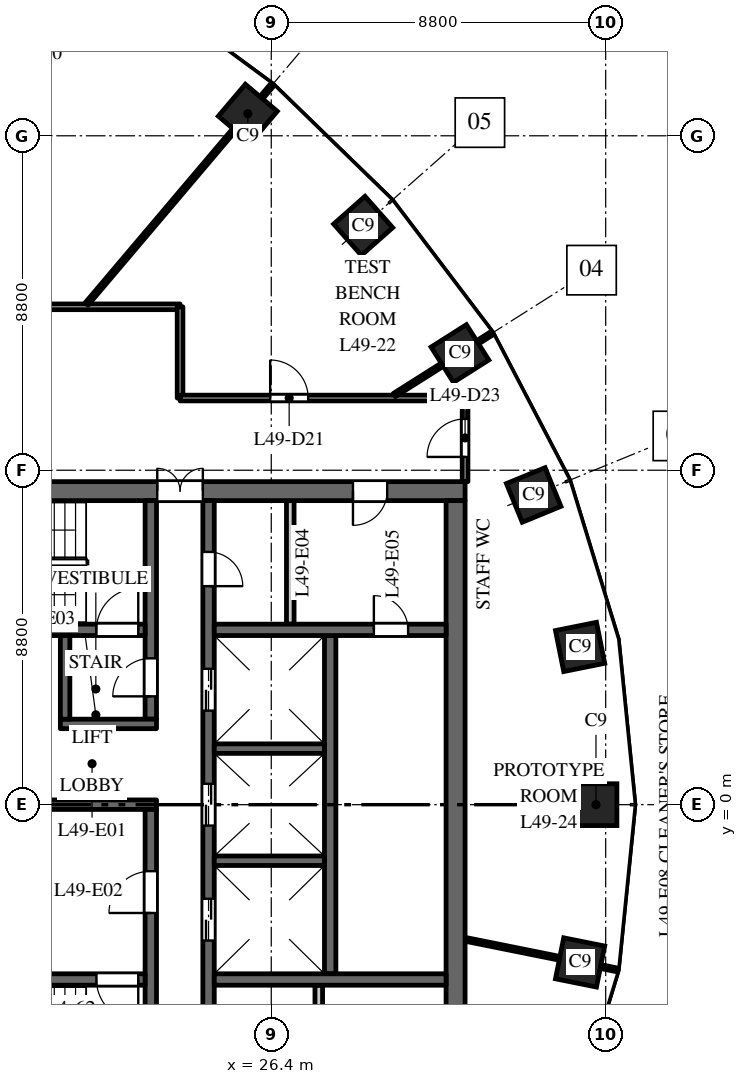
"""IFC4 building model, lengths in metres.
Left out: names, types, materials, properties, quantities, classifications, styles, units other than length and angle.
Written with IfcOpenShell. Run it as: python <this file> out.ifc"""

import sys

from ifc_helpers import new_model, si_unit, direction, frame, frame_2d, origin, origin_2d, place, context, subcontext, project, spatial, rectangle, extrude, element, fill, save


model = new_model("IFC4")
c1 = context("Model", 3, precision=1e-05, world=origin(), true_north=direction((0.0, 1.0)))
c2 = subcontext(c1, "Body", "Model", "MODEL_VIEW")
j1 = project(units=[si_unit("LENGTHUNIT", "METRE"), si_unit("PLANEANGLEUNIT", "RADIAN")], contexts=[c1])
p1 = place(None, origin())
s1 = spatial("IfcSite", under=j1, at=p1, CompositionType="ELEMENT")
p2 = place(p1, origin())
s2 = spatial("IfcBuilding", under=s1, at=p2, CompositionType="ELEMENT")
p3 = place(p2, frame((0.0, 0.0, 237.5)))
s3 = spatial("IfcBuildingStorey", under=s2, at=p3, CompositionType="ELEMENT", Elevation=237.5)
for number, where, z_axis, x_axis in (
    (1, (34.945, 0.0, 0.0), (0.0, 0.0, 1.0), (0.0, 1.0, 0.0)),
    (2, (34.527, 4.151, 0.0), (0.0, 0.0, 1.0), (-0.197, 0.98, 0.0)),
    (3, (33.305, 8.149, 0.0), (0.0, 0.0, 1.0), (-0.379, 0.925, 0.0)),
    (4, (31.365, 11.871, 0.0), (0.0, 0.0, 1.0), (-0.535, 0.845, 0.0)),
    (5, (28.819, 15.23, 0.0), (0.0, 0.0, 1.0), (-0.663, 0.749, 0.0)),
    (6, (25.783, 18.18, 0.0), (0.0, 0.0, 1.0), (-0.763, 0.646, 0.0)),
    (7, (34.527, -4.151, 0.0), (0.0, 0.0, 1.0), (0.197, 0.98, 0.0)),
):
    element("IfcColumn", number, at=place(p3, frame(where, z_axis=z_axis, x_axis=x_axis)), inside=s3, PredefinedType="COLUMN", context=c2, shape_type="SweptSolid", body=[
        extrude(rectangle(XDim=1.1, YDim=1.1, at=origin_2d()), origin(), (0.0, 0.0, 1.0), 4.0),
    ])
p4 = place(p3, frame((16.5, 8.25, 0.0), z_axis=(0.0, 0.0, 1.0), x_axis=(1.0, 0.0, 0.0)))
e8 = element("IfcWall", 8, at=p4, inside=s3, PredefinedType="SHEAR", context=c2, shape_type="SweptSolid", body=[
    extrude(rectangle(XDim=15.0, YDim=0.5, at=frame_2d((7.5, 0.0))), origin(), (0.0, 0.0, 1.0), 3.7),
])
p5 = place(p4, frame((6.9, 0.0, 0.0)))
e9 = element("IfcOpeningElement", 9, at=p5, cuts=e8, PredefinedType="OPENING", context=c2, shape_type="SweptSolid", body=[
    extrude(rectangle(XDim=1.2, YDim=2.1, at=frame_2d((0.6, 1.05))), frame((0.0, 0.26, 0.0), z_axis=(0.0, -1.0, 0.0), x_axis=(1.0, 0.0, 0.0)), (0.0, 0.0, 1.0), 0.52),
])
p6 = place(p4, frame((12.05, 0.0, 0.0)))
e10 = element("IfcOpeningElement", 10, at=p6, cuts=e8, PredefinedType="OPENING", context=c2, shape_type="SweptSolid", body=[
    extrude(rectangle(XDim=0.9, YDim=2.1, at=frame_2d((0.45, 1.05))), frame((0.0, 0.26, 0.0), z_axis=(0.0, -1.0, 0.0), x_axis=(1.0, 0.0, 0.0)), (0.0, 0.0, 1.0), 0.52),
])
p7 = place(p3, frame((27.95, -4.45, 0.0), z_axis=(0.0, 0.0, 1.0), x_axis=(0.0, 1.0, 0.0)))
e11 = element("IfcWall", 11, at=p7, inside=s3, PredefinedType="SHEAR", context=c2, shape_type="SweptSolid", body=[
    extrude(rectangle(XDim=8.9, YDim=0.3, at=frame_2d((4.45, 0.0))), origin(), (0.0, 0.0, 1.0), 3.7),
])
p8 = place(p3, frame((24.75, -8.0, 0.0), z_axis=(0.0, 0.0, 1.0), x_axis=(0.0, 1.0, 0.0)))
e12 = element("IfcWall", 12, at=p8, inside=s3, PredefinedType="SHEAR", context=c2, shape_type="SweptSolid", body=[
    extrude(rectangle(XDim=16.0, YDim=0.3, at=frame_2d((8.0, 0.0))), origin(), (0.0, 0.0, 1.0), 3.7),
])
p9 = place(p8, frame((4.425, 0.0, 0.0)))
e13 = element("IfcOpeningElement", 13, at=p9, cuts=e12, PredefinedType="OPENING", context=c2, shape_type="SweptSolid", body=[
    extrude(rectangle(XDim=1.1, YDim=2.1, at=frame_2d((0.55, 1.05))), frame((0.0, 0.16, 0.0), z_axis=(0.0, -1.0, 0.0), x_axis=(1.0, 0.0, 0.0)), (0.0, 0.0, 1.0), 0.32),
])
p10 = place(p8, frame((7.45, 0.0, 0.0)))
e14 = element("IfcOpeningElement", 14, at=p10, cuts=e12, PredefinedType="OPENING", context=c2, shape_type="SweptSolid", body=[
    extrude(rectangle(XDim=1.1, YDim=2.1, at=frame_2d((0.55, 1.05))), frame((0.0, 0.16, 0.0), z_axis=(0.0, -1.0, 0.0), x_axis=(1.0, 0.0, 0.0)), (0.0, 0.0, 1.0), 0.32),
])
p11 = place(p8, frame((10.475, 0.0, 0.0)))
e15 = element("IfcOpeningElement", 15, at=p11, cuts=e12, PredefinedType="OPENING", context=c2, shape_type="SweptSolid", body=[
    extrude(rectangle(XDim=1.1, YDim=2.1, at=frame_2d((0.55, 1.05))), frame((0.0, 0.16, 0.0), z_axis=(0.0, -1.0, 0.0), x_axis=(1.0, 0.0, 0.0)), (0.0, 0.0, 1.0), 0.32),
])
p12 = place(p8, frame((13.75, 0.0, 0.0)))
e16 = element("IfcOpeningElement", 16, at=p12, cuts=e12, PredefinedType="OPENING", context=c2, shape_type="SweptSolid", body=[
    extrude(rectangle(XDim=0.9, YDim=2.1, at=frame_2d((0.45, 1.05))), frame((0.0, 0.16, 0.0), z_axis=(0.0, -1.0, 0.0), x_axis=(1.0, 0.0, 0.0)), (0.0, 0.0, 1.0), 0.32),
])
p13 = place(p8, frame((1.35, 0.0, 0.0)))
e17 = element("IfcOpeningElement", 17, at=p13, cuts=e12, PredefinedType="OPENING", context=c2, shape_type="SweptSolid", body=[
    extrude(rectangle(XDim=0.9, YDim=2.1, at=frame_2d((0.45, 1.05))), frame((0.0, 0.16, 0.0), z_axis=(0.0, -1.0, 0.0), x_axis=(1.0, 0.0, 0.0)), (0.0, 0.0, 1.0), 0.32),
])
p14 = place(p3, frame((20.1, 0.0, 0.0), z_axis=(0.0, 0.0, 1.0), x_axis=(1.0, 0.0, 0.0)))
e18 = element("IfcWall", 18, at=p14, inside=s3, PredefinedType="SHEAR", context=c2, shape_type="SweptSolid", body=[
    extrude(rectangle(XDim=3.28, YDim=0.25, at=frame_2d((1.64, 0.0))), origin(), (0.0, 0.0, 1.0), 3.7),
])
p15 = place(p3, frame((31.25, -8.0, 0.0), z_axis=(0.0, 0.0, 1.0), x_axis=(0.0, 1.0, 0.0)))
e19 = element("IfcWall", 19, at=p15, inside=s3, PredefinedType="SHEAR", context=c2, shape_type="SweptSolid", body=[
    extrude(rectangle(XDim=16.0, YDim=0.5, at=frame_2d((8.0, 0.0))), origin(), (0.0, 0.0, 1.0), 3.7),
])
p16 = place(p3, frame((24.9, 4.6, 0.0), z_axis=(0.0, 0.0, 1.0), x_axis=(1.0, 0.0, 0.0)))
e20 = element("IfcWall", 20, at=p16, inside=s3, PredefinedType="SHEAR", context=c2, shape_type="SweptSolid", body=[
    extrude(rectangle(XDim=6.1, YDim=0.3, at=frame_2d((3.05, 0.0))), origin(), (0.0, 0.0, 1.0), 3.7),
])
p17 = place(p16, frame((4.2, 0.0, 0.0)))
e21 = element("IfcOpeningElement", 21, at=p17, cuts=e20, PredefinedType="OPENING", context=c2, shape_type="SweptSolid", body=[
    extrude(rectangle(XDim=0.9, YDim=2.1, at=frame_2d((0.45, 1.05))), frame((0.0, 0.16, 0.0), z_axis=(0.0, -1.0, 0.0), x_axis=(1.0, 0.0, 0.0)), (0.0, 0.0, 1.0), 0.32),
])
for number, where, z_axis, x_axis in (
    (22, (26.9, 4.75, 0.0), (0.0, 0.0, 1.0), (0.0, 1.0, 0.0)),
    (23, (27.65, -8.0, 0.0), (0.0, 0.0, 1.0), (0.0, 1.0, 0.0)),
):
    element("IfcWall", number, at=place(p3, frame(where, z_axis=z_axis, x_axis=x_axis)), inside=s3, PredefinedType="PARTITIONING", context=c2, shape_type="SweptSolid", body=[
        extrude(rectangle(XDim=3.25, YDim=0.2, at=frame_2d((1.625, 0.0))), origin(), (0.0, 0.0, 1.0), 3.7),
    ])
p18 = place(p3, frame((24.9, -4.6, 0.0), z_axis=(0.0, 0.0, 1.0), x_axis=(1.0, 0.0, 0.0)))
e24 = element("IfcWall", 24, at=p18, inside=s3, PredefinedType="SHEAR", context=c2, shape_type="SweptSolid", body=[
    extrude(rectangle(XDim=6.1, YDim=0.3, at=frame_2d((3.05, 0.0))), origin(), (0.0, 0.0, 1.0), 3.7),
])
for number, where, z_axis, x_axis in (
    (25, (24.9, -1.475, 0.0), (0.0, 0.0, 1.0), (1.0, 0.0, 0.0)),
    (26, (24.9, 1.475, 0.0), (0.0, 0.0, 1.0), (1.0, 0.0, 0.0)),
):
    element("IfcWall", number, at=place(p3, frame(where, z_axis=z_axis, x_axis=x_axis)), inside=s3, PredefinedType="SHEAR", context=c2, shape_type="SweptSolid", body=[
        extrude(rectangle(XDim=2.9, YDim=0.25, at=frame_2d((1.45, 0.0))), origin(), (0.0, 0.0, 1.0), 3.7),
    ])
p19 = place(p3, frame((23.23, 2.25, 0.0), z_axis=(0.0, 0.0, 1.0), x_axis=(0.0, 1.0, 0.0)))
e27 = element("IfcWall", 27, at=p19, inside=s3, PredefinedType="SHEAR", context=c2, shape_type="SweptSolid", body=[
    extrude(rectangle(XDim=5.75, YDim=0.3, at=frame_2d((2.875, 0.0))), origin(), (0.0, 0.0, 1.0), 3.7),
])
p20 = place(p19, frame((0.6, 0.0, 0.0)))
e28 = element("IfcOpeningElement", 28, at=p20, cuts=e27, PredefinedType="OPENING", context=c2, shape_type="SweptSolid", body=[
    extrude(rectangle(XDim=1.0, YDim=2.1, at=frame_2d((0.5, 1.05))), frame((0.0, 0.16, 0.0), z_axis=(0.0, -1.0, 0.0), x_axis=(1.0, 0.0, 0.0)), (0.0, 0.0, 1.0), 0.32),
])
p21 = place(p3, frame((23.23, -8.0, 0.0), z_axis=(0.0, 0.0, 1.0), x_axis=(0.0, 1.0, 0.0)))
e29 = element("IfcWall", 29, at=p21, inside=s3, PredefinedType="SHEAR", context=c2, shape_type="SweptSolid", body=[
    extrude(rectangle(XDim=7.875, YDim=0.3, at=frame_2d((3.938, 0.0))), origin(), (0.0, 0.0, 1.0), 3.7),
])
p22 = place(p21, frame((5.15, 0.0, 0.0)))
e30 = element("IfcOpeningElement", 30, at=p22, cuts=e29, PredefinedType="OPENING", context=c2, shape_type="SweptSolid", body=[
    extrude(rectangle(XDim=1.1, YDim=2.1, at=frame_2d((0.55, 1.05))), frame((0.0, 0.16, 0.0), z_axis=(0.0, -1.0, 0.0), x_axis=(1.0, 0.0, 0.0)), (0.0, 0.0, 1.0), 0.32),
])
p23 = place(p3, frame((16.9, 4.6, 0.0), z_axis=(0.0, 0.0, 1.0), x_axis=(1.0, 0.0, 0.0)))
e31 = element("IfcWall", 31, at=p23, inside=s3, PredefinedType="SHEAR", context=c2, shape_type="SweptSolid", body=[
    extrude(rectangle(XDim=6.18, YDim=0.3, at=frame_2d((3.09, 0.0))), origin(), (0.0, 0.0, 1.0), 3.7),
])
p24 = place(p23, frame((4.9, 0.0, 0.0)))
e32 = element("IfcOpeningElement", 32, at=p24, cuts=e31, PredefinedType="OPENING", context=c2, shape_type="SweptSolid", body=[
    extrude(rectangle(XDim=1.1, YDim=2.1, at=frame_2d((0.55, 1.05))), frame((0.0, 0.16, 0.0), z_axis=(0.0, -1.0, 0.0), x_axis=(1.0, 0.0, 0.0)), (0.0, 0.0, 1.0), 0.32),
])
p25 = place(p3, frame((16.9, -4.6, 0.0), z_axis=(0.0, 0.0, 1.0), x_axis=(1.0, 0.0, 0.0)))
e33 = element("IfcWall", 33, at=p25, inside=s3, PredefinedType="SHEAR", context=c2, shape_type="SweptSolid", body=[
    extrude(rectangle(XDim=6.18, YDim=0.3, at=frame_2d((3.09, 0.0))), origin(), (0.0, 0.0, 1.0), 3.7),
])
p26 = place(p25, frame((4.9, 0.0, 0.0)))
e34 = element("IfcOpeningElement", 34, at=p26, cuts=e33, PredefinedType="OPENING", context=c2, shape_type="SweptSolid", body=[
    extrude(rectangle(XDim=1.1, YDim=2.1, at=frame_2d((0.55, 1.05))), frame((0.0, 0.16, 0.0), z_axis=(0.0, -1.0, 0.0), x_axis=(1.0, 0.0, 0.0)), (0.0, 0.0, 1.0), 0.32),
])
p27 = place(p3, frame((20.85, 2.125, 0.0), z_axis=(0.0, 0.0, 1.0), x_axis=(1.0, 0.0, 0.0)))
e35 = element("IfcWall", 35, at=p27, inside=s3, PredefinedType="SHEAR", context=c2, shape_type="SweptSolid", body=[
    extrude(rectangle(XDim=2.53, YDim=0.25, at=frame_2d((1.265, 0.0))), origin(), (0.0, 0.0, 1.0), 3.7),
])
p28 = place(p3, frame((20.975, 2.25, 0.0), z_axis=(0.0, 0.0, 1.0), x_axis=(0.0, 1.0, 0.0)))
e36 = element("IfcWall", 36, at=p28, inside=s3, PredefinedType="SHEAR", context=c2, shape_type="SweptSolid", body=[
    extrude(rectangle(XDim=2.2, YDim=0.25, at=frame_2d((1.1, 0.0))), origin(), (0.0, 0.0, 1.0), 3.7),
])
p29 = place(p3, frame((7.524, 13.1, 0.0), z_axis=(0.0, 0.0, 1.0), x_axis=(1.0, 0.0, 0.0)))
e37 = element("IfcWall", 37, at=p29, inside=s3, PredefinedType="PARTITIONING", context=c2, shape_type="SweptSolid", body=[
    extrude(rectangle(XDim=16.476, YDim=0.15, at=frame_2d((8.238, 0.0))), origin(), (0.0, 0.0, 1.0), 2.85),
])
p30 = place(p29, frame((2.746, 0.0, 0.0)))
e38 = element("IfcOpeningElement", 38, at=p30, cuts=e37, PredefinedType="OPENING", context=c2, shape_type="SweptSolid", body=[
    extrude(rectangle(XDim=1.0, YDim=2.1, at=frame_2d((0.5, 1.05))), frame((0.0, 0.085, 0.0), z_axis=(0.0, -1.0, 0.0), x_axis=(1.0, 0.0, 0.0)), (0.0, 0.0, 1.0), 0.17),
])
p31 = place(p29, frame((9.56, 0.0, 0.0)))
e39 = element("IfcOpeningElement", 39, at=p31, cuts=e37, PredefinedType="OPENING", context=c2, shape_type="SweptSolid", body=[
    extrude(rectangle(XDim=1.0, YDim=2.1, at=frame_2d((0.5, 1.05))), frame((0.0, 0.085, 0.0), z_axis=(0.0, -1.0, 0.0), x_axis=(1.0, 0.0, 0.0)), (0.0, 0.0, 1.0), 0.17),
])
p32 = place(p3, frame((21.542, 13.175, 0.0), z_axis=(0.0, 0.0, 1.0), x_axis=(0.646374865928, 0.763020008058, 0.0)))
e40 = element("IfcWall", 40, at=p32, inside=s3, PredefinedType="PARTITIONING", context=c2, shape_type="SweptSolid", body=[
    extrude(rectangle(XDim=7.562, YDim=0.1, at=frame_2d((3.781, 0.0))), origin(), (0.0, 0.0, 1.0), 3.0),
])
p33 = place(p3, frame((24.0, 10.7, 0.0), z_axis=(0.0, 0.0, 1.0), x_axis=(0.0, 1.0, 0.0)))
e41 = element("IfcWall", 41, at=p33, inside=s3, PredefinedType="PARTITIONING", context=c2, shape_type="SweptSolid", body=[
    extrude(rectangle(XDim=2.4, YDim=0.15, at=frame_2d((1.2, 0.0))), origin(), (0.0, 0.0, 1.0), 2.75),
])
p34 = place(p3, frame((24.0, 10.7, 0.0), z_axis=(0.0, 0.0, 1.0), x_axis=(1.0, 0.0, 0.0)))
e42 = element("IfcWall", 42, at=p34, inside=s3, PredefinedType="PARTITIONING", context=c2, shape_type="SweptSolid", body=[
    extrude(rectangle(XDim=7.5, YDim=0.15, at=frame_2d((3.75, 0.0))), origin(), (0.0, 0.0, 1.0), 3.0),
])
p35 = place(p34, frame((2.371, 0.0, 0.0)))
e43 = element("IfcOpeningElement", 43, at=p35, cuts=e42, PredefinedType="OPENING", context=c2, shape_type="SweptSolid", body=[
    extrude(rectangle(XDim=1.0, YDim=2.1, at=frame_2d((0.5, 1.05))), frame((0.0, 0.085, 0.0), z_axis=(0.0, -1.0, 0.0), x_axis=(1.0, 0.0, 0.0)), (0.0, 0.0, 1.0), 0.17),
])
p36 = place(p3, frame((29.637, 10.777, 0.0), z_axis=(0.0, 0.0, 1.0), x_axis=(0.844810627195, 0.535065420467, 0.0)))
e44 = element("IfcWall", 44, at=p36, inside=s3, PredefinedType="PARTITIONING", context=c2, shape_type="SweptSolid", body=[
    extrude(rectangle(XDim=3.048, YDim=0.1, at=frame_2d((1.524, 0.0))), origin(), (0.0, 0.0, 1.0), 3.0),
])
p37 = place(p3, frame((31.5, -3.542, 0.0), z_axis=(0.0, 0.0, 1.0), x_axis=(0.980357474535, -0.197228857227, 0.0)))
e45 = element("IfcWall", 45, at=p37, inside=s3, PredefinedType="PARTITIONING", context=c2, shape_type="SweptSolid", body=[
    extrude(rectangle(XDim=4.092, YDim=0.1, at=frame_2d((2.046, 0.0))), origin(), (0.0, 0.0, 1.0), 3.0),
])
p38 = place(p3, frame((31.5, 8.5, 0.0), z_axis=(0.0, 0.0, 1.0), x_axis=(0.0, 1.0, 0.0)))
e46 = element("IfcWall", 46, at=p38, inside=s3, PredefinedType="PARTITIONING", context=c2, shape_type="SweptSolid", body=[
    extrude(rectangle(XDim=2.2, YDim=0.15, at=frame_2d((1.1, 0.0))), origin(), (0.0, 0.0, 1.0), 3.0),
])
p39 = place(p38, frame((0.65, 0.0, 0.0)))
e47 = element("IfcOpeningElement", 47, at=p39, cuts=e46, PredefinedType="OPENING", context=c2, shape_type="SweptSolid", body=[
    extrude(rectangle(XDim=1.0, YDim=2.1, at=frame_2d((0.5, 1.05))), frame((0.0, 0.085, 0.0), z_axis=(0.0, -1.0, 0.0), x_axis=(1.0, 0.0, 0.0)), (0.0, 0.0, 1.0), 0.17),
])
p40 = place(p9, origin())
e48 = element("IfcDoor", 48, at=p40, inside=s3, OperationType="DOUBLE_DOOR_SLIDING", PredefinedType="DOOR", context=c2, shape_type="SweptSolid", body=[
    extrude(rectangle(XDim=1.1, YDim=2.1, at=frame_2d((0.55, 1.05))), frame((0.0, 0.025, 0.0), z_axis=(0.0, -1.0, 0.0), x_axis=(1.0, 0.0, 0.0)), (0.0, 0.0, 1.0), 0.05),
])
fill(e13, e48)
p41 = place(p10, origin())
e49 = element("IfcDoor", 49, at=p41, inside=s3, OperationType="DOUBLE_DOOR_SLIDING", PredefinedType="DOOR", context=c2, shape_type="SweptSolid", body=[
    extrude(rectangle(XDim=1.1, YDim=2.1, at=frame_2d((0.55, 1.05))), frame((0.0, 0.025, 0.0), z_axis=(0.0, -1.0, 0.0), x_axis=(1.0, 0.0, 0.0)), (0.0, 0.0, 1.0), 0.05),
])
fill(e14, e49)
p42 = place(p11, origin())
e50 = element("IfcDoor", 50, at=p42, inside=s3, OperationType="DOUBLE_DOOR_SLIDING", PredefinedType="DOOR", context=c2, shape_type="SweptSolid", body=[
    extrude(rectangle(XDim=1.1, YDim=2.1, at=frame_2d((0.55, 1.05))), frame((0.0, 0.025, 0.0), z_axis=(0.0, -1.0, 0.0), x_axis=(1.0, 0.0, 0.0)), (0.0, 0.0, 1.0), 0.05),
])
fill(e15, e50)
p43 = place(p24, origin())
e51 = element("IfcDoor", 51, at=p43, inside=s3, OperationType="SINGLE_SWING_LEFT", PredefinedType="DOOR", context=c2, shape_type="SweptSolid", body=[
    extrude(rectangle(XDim=1.1, YDim=2.1, at=frame_2d((0.55, 1.05))), frame((0.0, 0.025, 0.0), z_axis=(0.0, -1.0, 0.0), x_axis=(1.0, 0.0, 0.0)), (0.0, 0.0, 1.0), 0.05),
])
fill(e32, e51)
p44 = place(p26, origin())
e52 = element("IfcDoor", 52, at=p44, inside=s3, OperationType="SINGLE_SWING_RIGHT", PredefinedType="DOOR", context=c2, shape_type="SweptSolid", body=[
    extrude(rectangle(XDim=1.1, YDim=2.1, at=frame_2d((0.55, 1.05))), frame((0.0, 0.025, 0.0), z_axis=(0.0, -1.0, 0.0), x_axis=(1.0, 0.0, 0.0)), (0.0, 0.0, 1.0), 0.05),
])
fill(e34, e52)
p45 = place(p22, origin())
e53 = element("IfcDoor", 53, at=p45, inside=s3, OperationType="SINGLE_SWING_RIGHT", PredefinedType="DOOR", context=c2, shape_type="SweptSolid", body=[
    extrude(rectangle(XDim=1.1, YDim=2.1, at=frame_2d((0.55, 1.05))), frame((0.0, 0.025, 0.0), z_axis=(0.0, -1.0, 0.0), x_axis=(1.0, 0.0, 0.0)), (0.0, 0.0, 1.0), 0.05),
])
fill(e30, e53)
p46 = place(p20, origin())
e54 = element("IfcDoor", 54, at=p46, inside=s3, OperationType="SINGLE_SWING_RIGHT", PredefinedType="DOOR", context=c2, shape_type="SweptSolid", body=[
    extrude(rectangle(XDim=1.0, YDim=2.1, at=frame_2d((0.5, 1.05))), frame((0.0, 0.025, 0.0), z_axis=(0.0, -1.0, 0.0), x_axis=(1.0, 0.0, 0.0)), (0.0, 0.0, 1.0), 0.05),
])
fill(e28, e54)
p47 = place(p5, origin())
e55 = element("IfcDoor", 55, at=p47, inside=s3, OperationType="DOUBLE_DOOR_DOUBLE_SWING", PredefinedType="DOOR", context=c2, shape_type="SweptSolid", body=[
    extrude(rectangle(XDim=1.2, YDim=2.1, at=frame_2d((0.6, 1.05))), frame((0.0, 0.025, 0.0), z_axis=(0.0, -1.0, 0.0), x_axis=(1.0, 0.0, 0.0)), (0.0, 0.0, 1.0), 0.05),
])
fill(e9, e55)
p48 = place(p12, origin())
e56 = element("IfcDoor", 56, at=p48, inside=s3, OperationType="SINGLE_SWING_LEFT", PredefinedType="DOOR", context=c2, shape_type="SweptSolid", body=[
    extrude(rectangle(XDim=0.9, YDim=2.1, at=frame_2d((0.45, 1.05))), frame((0.0, 0.025, 0.0), z_axis=(0.0, -1.0, 0.0), x_axis=(1.0, 0.0, 0.0)), (0.0, 0.0, 1.0), 0.05),
])
fill(e16, e56)
p49 = place(p6, origin())
e57 = element("IfcDoor", 57, at=p49, inside=s3, OperationType="SINGLE_SWING_LEFT", PredefinedType="DOOR", context=c2, shape_type="SweptSolid", body=[
    extrude(rectangle(XDim=0.9, YDim=2.1, at=frame_2d((0.45, 1.05))), frame((0.0, 0.025, 0.0), z_axis=(0.0, -1.0, 0.0), x_axis=(1.0, 0.0, 0.0)), (0.0, 0.0, 1.0), 0.05),
])
fill(e10, e57)
p50 = place(p17, origin())
e58 = element("IfcDoor", 58, at=p50, inside=s3, OperationType="SINGLE_SWING_RIGHT", PredefinedType="DOOR", context=c2, shape_type="SweptSolid", body=[
    extrude(rectangle(XDim=0.9, YDim=2.1, at=frame_2d((0.45, 1.05))), frame((0.0, 0.025, 0.0), z_axis=(0.0, -1.0, 0.0), x_axis=(1.0, 0.0, 0.0)), (0.0, 0.0, 1.0), 0.05),
])
fill(e21, e58)
p51 = place(p35, origin())
e59 = element("IfcDoor", 59, at=p51, inside=s3, OperationType="SINGLE_SWING_LEFT", PredefinedType="DOOR", context=c2, shape_type="SweptSolid", body=[
    extrude(rectangle(XDim=1.0, YDim=2.1, at=frame_2d((0.5, 1.05))), frame((0.0, 0.025, 0.0), z_axis=(0.0, -1.0, 0.0), x_axis=(1.0, 0.0, 0.0)), (0.0, 0.0, 1.0), 0.05),
])
fill(e43, e59)
p52 = place(p39, origin())
e60 = element("IfcDoor", 60, at=p52, inside=s3, OperationType="SINGLE_SWING_LEFT", PredefinedType="DOOR", context=c2, shape_type="SweptSolid", body=[
    extrude(rectangle(XDim=1.0, YDim=2.1, at=frame_2d((0.5, 1.05))), frame((0.0, 0.025, 0.0), z_axis=(0.0, -1.0, 0.0), x_axis=(1.0, 0.0, 0.0)), (0.0, 0.0, 1.0), 0.05),
])
fill(e47, e60)
save(model, sys.argv[1])
